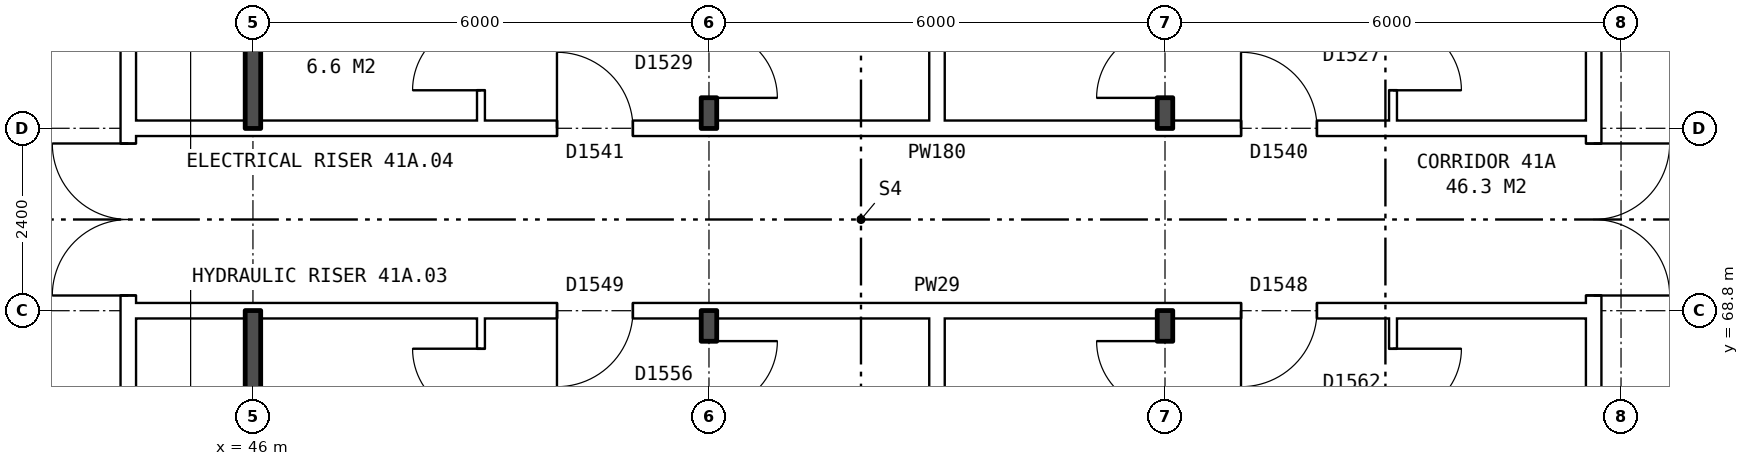
"""IFC4 building model, lengths in metres.
Left out: names, types, materials, properties, quantities, classifications, styles, units other than length and angle.
Written with IfcOpenShell. Run it as: python <this file> out.ifc"""

import sys

from ifc_helpers import new_model, si_unit, direction, frame, frame_2d, origin, place, context, subcontext, project, spatial, rectangle, extrude, element, fill, save


model = new_model("IFC4")
c1 = context("Model", 3, precision=1e-05, world=origin(), true_north=direction((0.0, 1.0)))
c2 = subcontext(c1, "Body", "Model", "MODEL_VIEW")
j1 = project(units=[si_unit("LENGTHUNIT", "METRE"), si_unit("PLANEANGLEUNIT", "RADIAN")], contexts=[c1])
p1 = place(None, origin())
s1 = spatial("IfcSite", under=j1, at=p1, CompositionType="ELEMENT")
p2 = place(p1, origin())
s2 = spatial("IfcBuilding", under=s1, at=p2, CompositionType="ELEMENT")
p3 = place(p2, frame((0.0, 0.0, 148.5)))
s3 = spatial("IfcBuildingStorey", under=s2, at=p3, CompositionType="ELEMENT", Elevation=148.5)
p4 = place(p3, frame((63.64, 63.9, 0.0), z_axis=(0.0, 0.0, 1.0), x_axis=(0.0, 1.0, 0.0)))
e1 = element("IfcWall", 1, at=p4, inside=s3, PredefinedType="PARTITIONING", context=c2, shape_type="SweptSolid", body=[
    extrude(rectangle(XDim=12.2, YDim=0.2, at=frame_2d((6.1, 0.0))), origin(), (0.0, 0.0, 1.0), 2.85),
])
p5 = place(p4, frame((5.1, 0.0, 0.0)))
e2 = element("IfcOpeningElement", 2, at=p5, cuts=e1, PredefinedType="OPENING", context=c2, shape_type="SweptSolid", body=[
    extrude(rectangle(XDim=2.0, YDim=2.1, at=frame_2d((1.0, 1.05))), frame((0.0, 0.11, 0.0), z_axis=(0.0, -1.0, 0.0), x_axis=(1.0, 0.0, 0.0)), (0.0, 0.0, 1.0), 0.22),
])
p6 = place(p3, frame((44.36, 63.9, 0.0), z_axis=(0.0, 0.0, 1.0), x_axis=(0.0, 1.0, 0.0)))
e3 = element("IfcWall", 3, at=p6, inside=s3, PredefinedType="PARTITIONING", context=c2, shape_type="SweptSolid", body=[
    extrude(rectangle(XDim=12.2, YDim=0.2, at=frame_2d((6.1, 0.0))), origin(), (0.0, 0.0, 1.0), 2.85),
])
p7 = place(p6, frame((5.1, 0.0, 0.0)))
e4 = element("IfcOpeningElement", 4, at=p7, cuts=e3, PredefinedType="OPENING", context=c2, shape_type="SweptSolid", body=[
    extrude(rectangle(XDim=2.0, YDim=2.1, at=frame_2d((1.0, 1.05))), frame((0.0, 0.11, 0.0), z_axis=(0.0, -1.0, 0.0), x_axis=(1.0, 0.0, 0.0)), (0.0, 0.0, 1.0), 0.22),
])
p8 = place(p3, frame((44.36, 68.8, 0.0), z_axis=(0.0, 0.0, 1.0), x_axis=(1.0, 0.0, 0.0)))
e5 = element("IfcWall", 5, at=p8, inside=s3, PredefinedType="PARTITIONING", context=c2, shape_type="SweptSolid", body=[
    extrude(rectangle(XDim=19.28, YDim=0.2, at=frame_2d((9.64, 0.0))), origin(), (0.0, 0.0, 1.0), 2.85),
])
p9 = place(p8, frame((14.64, 0.0, 0.0)))
e6 = element("IfcOpeningElement", 6, at=p9, cuts=e5, PredefinedType="OPENING", context=c2, shape_type="SweptSolid", body=[
    extrude(rectangle(XDim=1.0, YDim=2.1, at=frame_2d((0.5, 1.05))), frame((0.0, 0.11, 0.0), z_axis=(0.0, -1.0, 0.0), x_axis=(1.0, 0.0, 0.0)), (0.0, 0.0, 1.0), 0.22),
])
p10 = place(p8, frame((5.64, 0.0, 0.0)))
e7 = element("IfcOpeningElement", 7, at=p10, cuts=e5, PredefinedType="OPENING", context=c2, shape_type="SweptSolid", body=[
    extrude(rectangle(XDim=1.0, YDim=2.1, at=frame_2d((0.5, 1.05))), frame((0.0, 0.11, 0.0), z_axis=(0.0, -1.0, 0.0), x_axis=(1.0, 0.0, 0.0)), (0.0, 0.0, 1.0), 0.22),
])
p11 = place(p3, frame((44.36, 71.2, 0.0), z_axis=(0.0, 0.0, 1.0), x_axis=(1.0, 0.0, 0.0)))
e8 = element("IfcWall", 8, at=p11, inside=s3, PredefinedType="PARTITIONING", context=c2, shape_type="SweptSolid", body=[
    extrude(rectangle(XDim=19.28, YDim=0.2, at=frame_2d((9.64, 0.0))), origin(), (0.0, 0.0, 1.0), 2.85),
])
p12 = place(p11, frame((14.64, 0.0, 0.0)))
e9 = element("IfcOpeningElement", 9, at=p12, cuts=e8, PredefinedType="OPENING", context=c2, shape_type="SweptSolid", body=[
    extrude(rectangle(XDim=1.0, YDim=2.1, at=frame_2d((0.5, 1.05))), frame((0.0, 0.11, 0.0), z_axis=(0.0, -1.0, 0.0), x_axis=(1.0, 0.0, 0.0)), (0.0, 0.0, 1.0), 0.22),
])
p13 = place(p11, frame((5.64, 0.0, 0.0)))
e10 = element("IfcOpeningElement", 10, at=p13, cuts=e8, PredefinedType="OPENING", context=c2, shape_type="SweptSolid", body=[
    extrude(rectangle(XDim=1.0, YDim=2.1, at=frame_2d((0.5, 1.05))), frame((0.0, 0.11, 0.0), z_axis=(0.0, -1.0, 0.0), x_axis=(1.0, 0.0, 0.0)), (0.0, 0.0, 1.0), 0.22),
])
for number, where, z_axis, x_axis in (
    (11, (46.0, 63.8, 0.0), (0.0, 0.0, 1.0), (0.0, 1.0, 0.0)),
    (12, (46.0, 71.2, 0.0), (0.0, 0.0, 1.0), (0.0, 1.0, 0.0)),
):
    element("IfcWall", number, at=place(p3, frame(where, z_axis=z_axis, x_axis=x_axis)), inside=s3, PredefinedType="SOLIDWALL", context=c2, shape_type="SweptSolid", body=[
        extrude(rectangle(XDim=5.0, YDim=0.2, at=frame_2d((2.5, 0.0))), origin(), (0.0, 0.0, 1.0), 2.85),
    ])
p14 = place(p3, frame((49.0, 54.36, 0.0), z_axis=(0.0, 0.0, 1.0), x_axis=(0.0, 1.0, 0.0)))
e13 = element("IfcWall", 13, at=p14, inside=s3, PredefinedType="PARTITIONING", context=c2, shape_type="SweptSolid", body=[
    extrude(rectangle(XDim=14.34, YDim=0.1, at=frame_2d((7.17, 0.0))), origin(), (0.0, 0.0, 1.0), 2.85),
])
p15 = place(p14, frame((7.7, 0.0, 0.0)))
e14 = element("IfcOpeningElement", 14, at=p15, cuts=e13, PredefinedType="OPENING", context=c2, shape_type="SweptSolid", body=[
    extrude(rectangle(XDim=0.9, YDim=2.1, at=frame_2d((0.45, 1.05))), frame((0.0, 0.06, 0.0), z_axis=(0.0, -1.0, 0.0), x_axis=(1.0, 0.0, 0.0)), (0.0, 0.0, 1.0), 0.12),
])
p16 = place(p14, frame((13.04, 0.0, 0.0)))
e15 = element("IfcOpeningElement", 15, at=p16, cuts=e13, PredefinedType="OPENING", context=c2, shape_type="SweptSolid", body=[
    extrude(rectangle(XDim=0.9, YDim=2.1, at=frame_2d((0.45, 1.05))), frame((0.0, 0.06, 0.0), z_axis=(0.0, -1.0, 0.0), x_axis=(1.0, 0.0, 0.0)), (0.0, 0.0, 1.0), 0.12),
])
p17 = place(p3, frame((49.0, 71.3, 0.0), z_axis=(0.0, 0.0, 1.0), x_axis=(0.0, 1.0, 0.0)))
e16 = element("IfcWall", 16, at=p17, inside=s3, PredefinedType="PARTITIONING", context=c2, shape_type="SweptSolid", body=[
    extrude(rectangle(XDim=14.34, YDim=0.1, at=frame_2d((7.17, 0.0))), origin(), (0.0, 0.0, 1.0), 2.85),
])
p18 = place(p17, frame((5.74, 0.0, 0.0)))
e17 = element("IfcOpeningElement", 17, at=p18, cuts=e16, PredefinedType="OPENING", context=c2, shape_type="SweptSolid", body=[
    extrude(rectangle(XDim=0.9, YDim=2.1, at=frame_2d((0.45, 1.05))), frame((0.0, 0.06, 0.0), z_axis=(0.0, -1.0, 0.0), x_axis=(1.0, 0.0, 0.0)), (0.0, 0.0, 1.0), 0.12),
])
p19 = place(p17, frame((0.4, 0.0, 0.0)))
e18 = element("IfcOpeningElement", 18, at=p19, cuts=e16, PredefinedType="OPENING", context=c2, shape_type="SweptSolid", body=[
    extrude(rectangle(XDim=0.9, YDim=2.1, at=frame_2d((0.45, 1.05))), frame((0.0, 0.06, 0.0), z_axis=(0.0, -1.0, 0.0), x_axis=(1.0, 0.0, 0.0)), (0.0, 0.0, 1.0), 0.12),
])
p20 = place(p3, frame((52.0, 54.36, 0.0), z_axis=(0.0, 0.0, 1.0), x_axis=(0.0, 1.0, 0.0)))
e19 = element("IfcWall", 19, at=p20, inside=s3, PredefinedType="SOLIDWALL", context=c2, shape_type="SweptSolid", body=[
    extrude(rectangle(XDim=14.44, YDim=0.2, at=frame_2d((7.22, 0.0))), origin(), (0.0, 0.0, 1.0), 2.85),
])
p21 = place(p20, frame((7.7, 0.0, 0.0)))
e20 = element("IfcOpeningElement", 20, at=p21, cuts=e19, PredefinedType="OPENING", context=c2, shape_type="SweptSolid", body=[
    extrude(rectangle(XDim=0.9, YDim=2.1, at=frame_2d((0.45, 1.05))), frame((0.0, 0.11, 0.0), z_axis=(0.0, -1.0, 0.0), x_axis=(1.0, 0.0, 0.0)), (0.0, 0.0, 1.0), 0.22),
])
p22 = place(p20, frame((13.14, 0.0, 0.0)))
e21 = element("IfcOpeningElement", 21, at=p22, cuts=e19, PredefinedType="OPENING", context=c2, shape_type="SweptSolid", body=[
    extrude(rectangle(XDim=0.9, YDim=2.1, at=frame_2d((0.45, 1.05))), frame((0.0, 0.11, 0.0), z_axis=(0.0, -1.0, 0.0), x_axis=(1.0, 0.0, 0.0)), (0.0, 0.0, 1.0), 0.22),
])
p23 = place(p3, frame((52.0, 71.2, 0.0), z_axis=(0.0, 0.0, 1.0), x_axis=(0.0, 1.0, 0.0)))
e22 = element("IfcWall", 22, at=p23, inside=s3, PredefinedType="SOLIDWALL", context=c2, shape_type="SweptSolid", body=[
    extrude(rectangle(XDim=14.44, YDim=0.2, at=frame_2d((7.22, 0.0))), origin(), (0.0, 0.0, 1.0), 2.85),
])
p24 = place(p23, frame((5.84, 0.0, 0.0)))
e23 = element("IfcOpeningElement", 23, at=p24, cuts=e22, PredefinedType="OPENING", context=c2, shape_type="SweptSolid", body=[
    extrude(rectangle(XDim=0.9, YDim=2.1, at=frame_2d((0.45, 1.05))), frame((0.0, 0.11, 0.0), z_axis=(0.0, -1.0, 0.0), x_axis=(1.0, 0.0, 0.0)), (0.0, 0.0, 1.0), 0.22),
])
p25 = place(p23, frame((0.4, 0.0, 0.0)))
e24 = element("IfcOpeningElement", 24, at=p25, cuts=e22, PredefinedType="OPENING", context=c2, shape_type="SweptSolid", body=[
    extrude(rectangle(XDim=0.9, YDim=2.1, at=frame_2d((0.45, 1.05))), frame((0.0, 0.11, 0.0), z_axis=(0.0, -1.0, 0.0), x_axis=(1.0, 0.0, 0.0)), (0.0, 0.0, 1.0), 0.22),
])
for number, where, z_axis, x_axis in (
    (25, (55.0, 54.36, 0.0), (0.0, 0.0, 1.0), (0.0, 1.0, 0.0)),
    (26, (55.0, 71.3, 0.0), (0.0, 0.0, 1.0), (0.0, 1.0, 0.0)),
):
    element("IfcWall", number, at=place(p3, frame(where, z_axis=z_axis, x_axis=x_axis)), inside=s3, PredefinedType="PARTITIONING", context=c2, shape_type="SweptSolid", body=[
        extrude(rectangle(XDim=14.34, YDim=0.2, at=frame_2d((7.17, 0.0))), origin(), (0.0, 0.0, 1.0), 2.85),
    ])
p26 = place(p3, frame((58.0, 54.36, 0.0), z_axis=(0.0, 0.0, 1.0), x_axis=(0.0, 1.0, 0.0)))
e27 = element("IfcWall", 27, at=p26, inside=s3, PredefinedType="SOLIDWALL", context=c2, shape_type="SweptSolid", body=[
    extrude(rectangle(XDim=14.44, YDim=0.2, at=frame_2d((7.22, 0.0))), origin(), (0.0, 0.0, 1.0), 2.85),
])
p27 = place(p26, frame((7.7, 0.0, 0.0)))
e28 = element("IfcOpeningElement", 28, at=p27, cuts=e27, PredefinedType="OPENING", context=c2, shape_type="SweptSolid", body=[
    extrude(rectangle(XDim=0.9, YDim=2.1, at=frame_2d((0.45, 1.05))), frame((0.0, 0.11, 0.0), z_axis=(0.0, -1.0, 0.0), x_axis=(1.0, 0.0, 0.0)), (0.0, 0.0, 1.0), 0.22),
])
p28 = place(p26, frame((13.14, 0.0, 0.0)))
e29 = element("IfcOpeningElement", 29, at=p28, cuts=e27, PredefinedType="OPENING", context=c2, shape_type="SweptSolid", body=[
    extrude(rectangle(XDim=0.9, YDim=2.1, at=frame_2d((0.45, 1.05))), frame((0.0, 0.11, 0.0), z_axis=(0.0, -1.0, 0.0), x_axis=(1.0, 0.0, 0.0)), (0.0, 0.0, 1.0), 0.22),
])
p29 = place(p3, frame((58.0, 71.2, 0.0), z_axis=(0.0, 0.0, 1.0), x_axis=(0.0, 1.0, 0.0)))
e30 = element("IfcWall", 30, at=p29, inside=s3, PredefinedType="SOLIDWALL", context=c2, shape_type="SweptSolid", body=[
    extrude(rectangle(XDim=14.44, YDim=0.2, at=frame_2d((7.22, 0.0))), origin(), (0.0, 0.0, 1.0), 2.85),
])
p30 = place(p29, frame((5.84, 0.0, 0.0)))
e31 = element("IfcOpeningElement", 31, at=p30, cuts=e30, PredefinedType="OPENING", context=c2, shape_type="SweptSolid", body=[
    extrude(rectangle(XDim=0.9, YDim=2.1, at=frame_2d((0.45, 1.05))), frame((0.0, 0.11, 0.0), z_axis=(0.0, -1.0, 0.0), x_axis=(1.0, 0.0, 0.0)), (0.0, 0.0, 1.0), 0.22),
])
p31 = place(p29, frame((0.4, 0.0, 0.0)))
e32 = element("IfcOpeningElement", 32, at=p31, cuts=e30, PredefinedType="OPENING", context=c2, shape_type="SweptSolid", body=[
    extrude(rectangle(XDim=0.9, YDim=2.1, at=frame_2d((0.45, 1.05))), frame((0.0, 0.11, 0.0), z_axis=(0.0, -1.0, 0.0), x_axis=(1.0, 0.0, 0.0)), (0.0, 0.0, 1.0), 0.22),
])
p32 = place(p3, frame((61.0, 54.36, 0.0), z_axis=(0.0, 0.0, 1.0), x_axis=(0.0, 1.0, 0.0)))
e33 = element("IfcWall", 33, at=p32, inside=s3, PredefinedType="PARTITIONING", context=c2, shape_type="SweptSolid", body=[
    extrude(rectangle(XDim=14.34, YDim=0.1, at=frame_2d((7.17, 0.0))), origin(), (0.0, 0.0, 1.0), 2.85),
])
p33 = place(p32, frame((7.7, 0.0, 0.0)))
e34 = element("IfcOpeningElement", 34, at=p33, cuts=e33, PredefinedType="OPENING", context=c2, shape_type="SweptSolid", body=[
    extrude(rectangle(XDim=0.9, YDim=2.1, at=frame_2d((0.45, 1.05))), frame((0.0, 0.06, 0.0), z_axis=(0.0, -1.0, 0.0), x_axis=(1.0, 0.0, 0.0)), (0.0, 0.0, 1.0), 0.12),
])
p34 = place(p32, frame((13.04, 0.0, 0.0)))
e35 = element("IfcOpeningElement", 35, at=p34, cuts=e33, PredefinedType="OPENING", context=c2, shape_type="SweptSolid", body=[
    extrude(rectangle(XDim=0.9, YDim=2.1, at=frame_2d((0.45, 1.05))), frame((0.0, 0.06, 0.0), z_axis=(0.0, -1.0, 0.0), x_axis=(1.0, 0.0, 0.0)), (0.0, 0.0, 1.0), 0.12),
])
p35 = place(p3, frame((61.0, 71.3, 0.0), z_axis=(0.0, 0.0, 1.0), x_axis=(0.0, 1.0, 0.0)))
e36 = element("IfcWall", 36, at=p35, inside=s3, PredefinedType="PARTITIONING", context=c2, shape_type="SweptSolid", body=[
    extrude(rectangle(XDim=14.34, YDim=0.1, at=frame_2d((7.17, 0.0))), origin(), (0.0, 0.0, 1.0), 2.85),
])
p36 = place(p35, frame((5.74, 0.0, 0.0)))
e37 = element("IfcOpeningElement", 37, at=p36, cuts=e36, PredefinedType="OPENING", context=c2, shape_type="SweptSolid", body=[
    extrude(rectangle(XDim=0.9, YDim=2.1, at=frame_2d((0.45, 1.05))), frame((0.0, 0.06, 0.0), z_axis=(0.0, -1.0, 0.0), x_axis=(1.0, 0.0, 0.0)), (0.0, 0.0, 1.0), 0.12),
])
p37 = place(p35, frame((0.4, 0.0, 0.0)))
e38 = element("IfcOpeningElement", 38, at=p37, cuts=e36, PredefinedType="OPENING", context=c2, shape_type="SweptSolid", body=[
    extrude(rectangle(XDim=0.9, YDim=2.1, at=frame_2d((0.45, 1.05))), frame((0.0, 0.06, 0.0), z_axis=(0.0, -1.0, 0.0), x_axis=(1.0, 0.0, 0.0)), (0.0, 0.0, 1.0), 0.12),
])
p38 = place(p5, frame((2.0, 0.0, 0.0), z_axis=(0.0, 0.0, 1.0), x_axis=(-1.0, 0.0, 0.0)))
e39 = element("IfcDoor", 39, at=p38, inside=s3, OperationType="DOUBLE_DOOR_SINGLE_SWING", PredefinedType="DOOR", context=c2, shape_type="SweptSolid", body=[
    extrude(rectangle(XDim=2.0, YDim=2.1, at=frame_2d((1.0, 1.05))), frame((0.0, 0.025, 0.0), z_axis=(0.0, -1.0, 0.0), x_axis=(1.0, 0.0, 0.0)), (0.0, 0.0, 1.0), 0.05),
])
fill(e2, e39)
p39 = place(p7, origin())
e40 = element("IfcDoor", 40, at=p39, inside=s3, OperationType="DOUBLE_DOOR_SINGLE_SWING", PredefinedType="DOOR", context=c2, shape_type="SweptSolid", body=[
    extrude(rectangle(XDim=2.0, YDim=2.1, at=frame_2d((1.0, 1.05))), frame((0.0, 0.025, 0.0), z_axis=(0.0, -1.0, 0.0), x_axis=(1.0, 0.0, 0.0)), (0.0, 0.0, 1.0), 0.05),
])
fill(e4, e40)
p40 = place(p9, frame((1.0, 0.0, 0.0), z_axis=(0.0, 0.0, 1.0), x_axis=(-1.0, 0.0, 0.0)))
e41 = element("IfcDoor", 41, at=p40, inside=s3, OperationType="SINGLE_SWING_RIGHT", PredefinedType="DOOR", context=c2, shape_type="SweptSolid", body=[
    extrude(rectangle(XDim=1.0, YDim=2.1, at=frame_2d((0.5, 1.05))), frame((0.0, 0.025, 0.0), z_axis=(0.0, -1.0, 0.0), x_axis=(1.0, 0.0, 0.0)), (0.0, 0.0, 1.0), 0.05),
])
fill(e6, e41)
p41 = place(p34, frame((0.9, 0.0, 0.0), z_axis=(0.0, 0.0, 1.0), x_axis=(-1.0, 0.0, 0.0)))
e42 = element("IfcDoor", 42, at=p41, inside=s3, OperationType="SINGLE_SWING_LEFT", PredefinedType="DOOR", context=c2, shape_type="SweptSolid", body=[
    extrude(rectangle(XDim=0.9, YDim=2.1, at=frame_2d((0.45, 1.05))), frame((0.0, 0.025, 0.0), z_axis=(0.0, -1.0, 0.0), x_axis=(1.0, 0.0, 0.0)), (0.0, 0.0, 1.0), 0.05),
])
fill(e35, e42)
p42 = place(p28, origin())
e43 = element("IfcDoor", 43, at=p42, inside=s3, OperationType="SINGLE_SWING_RIGHT", PredefinedType="DOOR", context=c2, shape_type="SweptSolid", body=[
    extrude(rectangle(XDim=0.9, YDim=2.1, at=frame_2d((0.45, 1.05))), frame((0.0, 0.025, 0.0), z_axis=(0.0, -1.0, 0.0), x_axis=(1.0, 0.0, 0.0)), (0.0, 0.0, 1.0), 0.05),
])
fill(e29, e43)
p43 = place(p10, frame((1.0, 0.0, 0.0), z_axis=(0.0, 0.0, 1.0), x_axis=(-1.0, 0.0, 0.0)))
e44 = element("IfcDoor", 44, at=p43, inside=s3, OperationType="SINGLE_SWING_RIGHT", PredefinedType="DOOR", context=c2, shape_type="SweptSolid", body=[
    extrude(rectangle(XDim=1.0, YDim=2.1, at=frame_2d((0.5, 1.05))), frame((0.0, 0.025, 0.0), z_axis=(0.0, -1.0, 0.0), x_axis=(1.0, 0.0, 0.0)), (0.0, 0.0, 1.0), 0.05),
])
fill(e7, e44)
p44 = place(p22, frame((0.9, 0.0, 0.0), z_axis=(0.0, 0.0, 1.0), x_axis=(-1.0, 0.0, 0.0)))
e45 = element("IfcDoor", 45, at=p44, inside=s3, OperationType="SINGLE_SWING_LEFT", PredefinedType="DOOR", context=c2, shape_type="SweptSolid", body=[
    extrude(rectangle(XDim=0.9, YDim=2.1, at=frame_2d((0.45, 1.05))), frame((0.0, 0.025, 0.0), z_axis=(0.0, -1.0, 0.0), x_axis=(1.0, 0.0, 0.0)), (0.0, 0.0, 1.0), 0.05),
])
fill(e21, e45)
p45 = place(p16, origin())
e46 = element("IfcDoor", 46, at=p45, inside=s3, OperationType="SINGLE_SWING_RIGHT", PredefinedType="DOOR", context=c2, shape_type="SweptSolid", body=[
    extrude(rectangle(XDim=0.9, YDim=2.1, at=frame_2d((0.45, 1.05))), frame((0.0, 0.025, 0.0), z_axis=(0.0, -1.0, 0.0), x_axis=(1.0, 0.0, 0.0)), (0.0, 0.0, 1.0), 0.05),
])
fill(e15, e46)
p46 = place(p12, origin())
e47 = element("IfcDoor", 47, at=p46, inside=s3, OperationType="SINGLE_SWING_LEFT", PredefinedType="DOOR", context=c2, shape_type="SweptSolid", body=[
    extrude(rectangle(XDim=1.0, YDim=2.1, at=frame_2d((0.5, 1.05))), frame((0.0, 0.025, 0.0), z_axis=(0.0, -1.0, 0.0), x_axis=(1.0, 0.0, 0.0)), (0.0, 0.0, 1.0), 0.05),
])
fill(e9, e47)
p47 = place(p37, frame((0.9, 0.0, 0.0), z_axis=(0.0, 0.0, 1.0), x_axis=(-1.0, 0.0, 0.0)))
e48 = element("IfcDoor", 48, at=p47, inside=s3, OperationType="SINGLE_SWING_RIGHT", PredefinedType="DOOR", context=c2, shape_type="SweptSolid", body=[
    extrude(rectangle(XDim=0.9, YDim=2.1, at=frame_2d((0.45, 1.05))), frame((0.0, 0.025, 0.0), z_axis=(0.0, -1.0, 0.0), x_axis=(1.0, 0.0, 0.0)), (0.0, 0.0, 1.0), 0.05),
])
fill(e38, e48)
p48 = place(p31, origin())
e49 = element("IfcDoor", 49, at=p48, inside=s3, OperationType="SINGLE_SWING_LEFT", PredefinedType="DOOR", context=c2, shape_type="SweptSolid", body=[
    extrude(rectangle(XDim=0.9, YDim=2.1, at=frame_2d((0.45, 1.05))), frame((0.0, 0.025, 0.0), z_axis=(0.0, -1.0, 0.0), x_axis=(1.0, 0.0, 0.0)), (0.0, 0.0, 1.0), 0.05),
])
fill(e32, e49)
p49 = place(p13, origin())
e50 = element("IfcDoor", 50, at=p49, inside=s3, OperationType="SINGLE_SWING_LEFT", PredefinedType="DOOR", context=c2, shape_type="SweptSolid", body=[
    extrude(rectangle(XDim=1.0, YDim=2.1, at=frame_2d((0.5, 1.05))), frame((0.0, 0.025, 0.0), z_axis=(0.0, -1.0, 0.0), x_axis=(1.0, 0.0, 0.0)), (0.0, 0.0, 1.0), 0.05),
])
fill(e10, e50)
p50 = place(p25, frame((0.9, 0.0, 0.0), z_axis=(0.0, 0.0, 1.0), x_axis=(-1.0, 0.0, 0.0)))
e51 = element("IfcDoor", 51, at=p50, inside=s3, OperationType="SINGLE_SWING_RIGHT", PredefinedType="DOOR", context=c2, shape_type="SweptSolid", body=[
    extrude(rectangle(XDim=0.9, YDim=2.1, at=frame_2d((0.45, 1.05))), frame((0.0, 0.025, 0.0), z_axis=(0.0, -1.0, 0.0), x_axis=(1.0, 0.0, 0.0)), (0.0, 0.0, 1.0), 0.05),
])
fill(e24, e51)
p51 = place(p19, origin())
e52 = element("IfcDoor", 52, at=p51, inside=s3, OperationType="SINGLE_SWING_LEFT", PredefinedType="DOOR", context=c2, shape_type="SweptSolid", body=[
    extrude(rectangle(XDim=0.9, YDim=2.1, at=frame_2d((0.45, 1.05))), frame((0.0, 0.025, 0.0), z_axis=(0.0, -1.0, 0.0), x_axis=(1.0, 0.0, 0.0)), (0.0, 0.0, 1.0), 0.05),
])
fill(e18, e52)
save(model, sys.argv[1])
